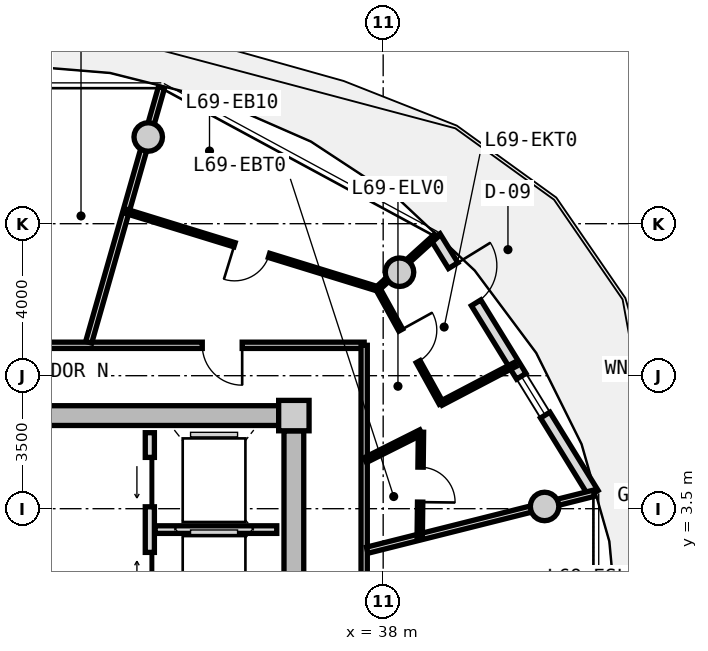
"""IFC4 building model, lengths in metres.
Left out: names, types, materials, properties, quantities, classifications, styles, units other than length and angle.
Written with IfcOpenShell. Run it as: python <this file> out.ifc"""

import sys

from ifc_helpers import new_model, si_unit, direction, frame, frame_2d, origin, origin_2d, place, context, subcontext, project, spatial, rectangle, circle, extrude, source, transform, mapped, element, fill, save


model = new_model("IFC4")
c1 = context("Model", 3, precision=1e-05, world=origin(), true_north=direction((0.0, 1.0)))
c2 = subcontext(c1, "Body", "Model", "MODEL_VIEW")
j1 = project(units=[si_unit("LENGTHUNIT", "METRE"), si_unit("PLANEANGLEUNIT", "RADIAN")], contexts=[c1])
p1 = place(None, origin())
s1 = spatial("IfcSite", under=j1, at=p1, CompositionType="ELEMENT")
p2 = place(p1, origin())
s2 = spatial("IfcBuilding", under=s1, at=p2, CompositionType="ELEMENT")
p3 = place(p2, frame((0.0, 0.0, 223.05)))
s3 = spatial("IfcBuildingStorey", under=s2, at=p3, CompositionType="ELEMENT", Elevation=223.05)
m1 = source(origin(), c2, "Body", "SweptSolid", [
    extrude(rectangle(XDim=0.8, YDim=0.8, at=origin_2d()), origin(), (0.0, 0.0, 1.0), 3.05),
])
p4 = place(p3, frame((35.65, 5.95, 0.0), z_axis=(0.0, 0.0, 1.0), x_axis=(1.0, 0.0, 0.0)))
e1 = element("IfcColumn", 1, at=p4, inside=s3, PredefinedType="COLUMN", context=c2, shape_type="MappedRepresentation", body=[
    mapped(m1, transform((0.0, 0.0, 0.0), x_axis=(1.0, 0.0, 0.0), y_axis=(0.0, 1.0, 0.0), z_axis=(0.0, 0.0, 1.0), scale=1.0)),
])
m2 = source(origin(), c2, "Body", "SweptSolid", [
    extrude(rectangle(XDim=14.5, YDim=0.52, at=frame_2d((7.25, 0.0))), origin(), (0.0, 0.0, 1.0), 2.76),
])
p5 = place(p3, frame((20.75, 5.95, 0.0), z_axis=(0.0, 0.0, 1.0), x_axis=(1.0, 0.0, 0.0)))
e2 = element("IfcWall", 2, at=p5, inside=s3, PredefinedType="SHEAR", context=c2, shape_type="MappedRepresentation", body=[
    mapped(m2, transform((0.0, 0.0, 0.0), x_axis=(1.0, 0.0, 0.0), y_axis=(0.0, 1.0, 0.0), z_axis=(0.0, 0.0, 1.0), scale=1.0)),
])
m3 = source(origin(), c2, "Body", "SweptSolid", [
    extrude(rectangle(XDim=11.1, YDim=0.52, at=frame_2d((5.55, 0.0))), origin(), (0.0, 0.0, 1.0), 2.76),
])
p6 = place(p3, frame((35.65, 5.55, 0.0), z_axis=(0.0, 0.0, 1.0), x_axis=(0.0, -1.0, 0.0)))
e3 = element("IfcWall", 3, at=p6, inside=s3, PredefinedType="SHEAR", context=c2, shape_type="MappedRepresentation", body=[
    mapped(m3, transform((0.0, 0.0, 0.0), x_axis=(1.0, 0.0, 0.0), y_axis=(0.0, 1.0, 0.0), z_axis=(0.0, 0.0, 1.0), scale=1.0)),
])
p7 = place(p6, frame((5.65, 0.0, 0.0)))
e4 = element("IfcOpeningElement", 4, at=p7, cuts=e3, PredefinedType="OPENING", context=c2, shape_type="SweptSolid", body=[
    extrude(rectangle(XDim=1.2, YDim=2.15, at=frame_2d((0.6, 1.075))), frame((0.0, 0.27, 0.0), z_axis=(0.0, -1.0, 0.0), x_axis=(1.0, 0.0, 0.0)), (0.0, 0.0, 1.0), 0.54),
])
m4 = source(origin(), c2, "Body", "SweptSolid", [
    extrude(circle(Radius=0.375, at=origin_2d()), origin(), (0.0, 0.0, 1.0), 3.05),
])
for number, where, z_axis, x_axis in (
    (5, (42.247, 3.559, 0.0), (0.0, 0.0, 1.0), (1.0, 0.0, 0.0)),
    (6, (38.43, 9.723, 0.0), (0.0, 0.0, 1.0), (1.0, 0.0, 0.0)),
    (7, (31.818, 13.281, 0.0), (0.0, 0.0, 1.0), (1.0, 0.0, 0.0)),
):
    element("IfcColumn", number, at=place(p3, frame(where, z_axis=z_axis, x_axis=x_axis)), inside=s3, PredefinedType="COLUMN", context=c2, shape_type="MappedRepresentation", body=[
        mapped(m4, transform((0.0, 0.0, 0.0), x_axis=(1.0, 0.0, 0.0), y_axis=(0.0, 1.0, 0.0), z_axis=(0.0, 0.0, 1.0), scale=1.0)),
    ])
m5 = source(origin(), c2, "Body", "SweptSolid", [
    extrude(rectangle(XDim=7.938, YDim=0.29, at=frame_2d((3.969, 0.0))), origin(), (0.0, 0.0, 1.0), 2.76),
])
p8 = place(p3, frame((39.37, 10.663, 0.0), z_axis=(0.0, 0.0, 1.0), x_axis=(0.524244987663, -0.851567491694, 0.0)))
e8 = element("IfcWall", 8, at=p8, inside=s3, PredefinedType="SOLIDWALL", context=c2, shape_type="MappedRepresentation", body=[
    mapped(m5, transform((0.0, 0.0, 0.0), x_axis=(1.0, 0.0, 0.0), y_axis=(0.0, 1.0, 0.0), z_axis=(0.0, 0.0, 1.0), scale=1.0)),
])
p9 = place(p8, frame((0.9, 0.0, 0.0)))
e9 = element("IfcOpeningElement", 9, at=p9, cuts=e8, PredefinedType="OPENING", context=c2, shape_type="SweptSolid", body=[
    extrude(rectangle(XDim=1.15, YDim=2.25, at=frame_2d((0.575, 1.125))), frame((0.0, 0.155, 0.0), z_axis=(0.0, -1.0, 0.0), x_axis=(1.0, 0.0, 0.0)), (0.0, 0.0, 1.0), 0.31),
])
p10 = place(p8, frame((4.319, 0.0, 0.85)))
e10 = element("IfcOpeningElement", 10, at=p10, cuts=e8, PredefinedType="OPENING", context=c2, shape_type="SweptSolid", body=[
    extrude(rectangle(XDim=1.2, YDim=1.5, at=frame_2d((0.6, 0.75))), frame((0.0, 0.155, 0.0), z_axis=(0.0, -1.0, 0.0), x_axis=(1.0, 0.0, 0.0)), (0.0, 0.0, 1.0), 0.31),
])
m6 = source(origin(), c2, "Body", "SweptSolid", [
    extrude(rectangle(XDim=5.0, YDim=0.24, at=frame_2d((2.5, 0.0))), origin(), (0.0, 0.0, 1.0), 2.745),
])
p11 = place(p3, frame((31.86, 0.5, 0.0), z_axis=(0.0, 0.0, 1.0), x_axis=(0.0, 1.0, 0.0)))
e11 = element("IfcWall", 11, at=p11, inside=s3, PredefinedType="PARTITIONING", context=c2, shape_type="MappedRepresentation", body=[
    mapped(m6, transform((0.0, 0.0, 0.0), x_axis=(1.0, 0.0, 0.0), y_axis=(0.0, 1.0, 0.0), z_axis=(0.0, 0.0, 1.0), scale=1.0)),
])
p12 = place(p11, frame((3.05, 0.0, 0.0)))
e12 = element("IfcOpeningElement", 12, at=p12, cuts=e11, PredefinedType="OPENING", context=c2, shape_type="SweptSolid", body=[
    extrude(rectangle(XDim=1.3, YDim=2.2, at=frame_2d((0.65, 1.1))), frame((0.0, 0.13, 0.0), z_axis=(0.0, -1.0, 0.0), x_axis=(1.0, 0.0, 0.0)), (0.0, 0.0, 1.0), 0.26),
])
p13 = place(p11, frame((0.55, 0.0, 0.0)))
e13 = element("IfcOpeningElement", 13, at=p13, cuts=e11, PredefinedType="OPENING", context=c2, shape_type="SweptSolid", body=[
    extrude(rectangle(XDim=1.3, YDim=2.2, at=frame_2d((0.65, 1.1))), frame((0.0, 0.13, 0.0), z_axis=(0.0, -1.0, 0.0), x_axis=(1.0, 0.0, 0.0)), (0.0, 0.0, 1.0), 0.26),
])
m7 = source(origin(), c2, "Body", "SweptSolid", [
    extrude(rectangle(XDim=3.2, YDim=0.2, at=frame_2d((1.6, 0.0))), origin(), (0.0, 0.0, 1.0), 2.745),
])
p14 = place(p3, frame((32.0, 2.95, 0.0), z_axis=(0.0, 0.0, 1.0), x_axis=(1.0, 0.0, 0.0)))
e14 = element("IfcWall", 14, at=p14, inside=s3, PredefinedType="PARTITIONING", context=c2, shape_type="MappedRepresentation", body=[
    mapped(m7, transform((0.0, 0.0, 0.0), x_axis=(1.0, 0.0, 0.0), y_axis=(0.0, 1.0, 0.0), z_axis=(0.0, 0.0, 1.0), scale=1.0)),
])
m8 = source(origin(), c2, "Body", "SweptSolid", [
    extrude(rectangle(XDim=8.58, YDim=0.165, at=frame_2d((4.29, 0.0))), origin(), (0.0, 0.0, 1.0), 2.745),
])
p15 = place(p3, frame((28.92, 7.8, 0.0), z_axis=(0.0, 0.0, 1.0), x_axis=(1.0, 0.0, 0.0)))
e15 = element("IfcWall", 15, at=p15, inside=s3, PredefinedType="PARTITIONING", context=c2, shape_type="MappedRepresentation", body=[
    mapped(m8, transform((0.0, 0.0, 0.0), x_axis=(1.0, 0.0, 0.0), y_axis=(0.0, 1.0, 0.0), z_axis=(0.0, 0.0, 1.0), scale=1.0)),
])
p16 = place(p15, frame((4.32, 0.0, 0.0)))
e16 = element("IfcOpeningElement", 16, at=p16, cuts=e15, PredefinedType="OPENING", context=c2, shape_type="SweptSolid", body=[
    extrude(rectangle(XDim=1.05, YDim=2.15, at=frame_2d((0.525, 1.075))), frame((0.0, 0.093, 0.0), z_axis=(0.0, -1.0, 0.0), x_axis=(1.0, 0.0, 0.0)), (0.0, 0.0, 1.0), 0.185),
])
m9 = source(origin(), c2, "Body", "SweptSolid", [
    extrude(rectangle(XDim=6.88, YDim=0.165, at=frame_2d((3.44, 0.0))), origin(), (0.0, 0.0, 1.0), 2.745),
])
p17 = place(p3, frame((37.5, 7.8, 0.0), z_axis=(0.0, 0.0, 1.0), x_axis=(0.0, -1.0, 0.0)))
e17 = element("IfcWall", 17, at=p17, inside=s3, PredefinedType="PARTITIONING", context=c2, shape_type="MappedRepresentation", body=[
    mapped(m9, transform((0.0, 0.0, 0.0), x_axis=(1.0, 0.0, 0.0), y_axis=(0.0, 1.0, 0.0), z_axis=(0.0, 0.0, 1.0), scale=1.0)),
])
m10 = source(origin(), c2, "Body", "SweptSolid", [
    extrude(rectangle(XDim=6.974, YDim=0.165, at=frame_2d((3.487, 0.0))), origin(), (0.0, 0.0, 1.0), 2.345),
])
p18 = place(p3, frame((30.251, 7.88, 0.0), z_axis=(0.0, 0.0, 1.0), x_axis=(0.274707256801, 0.961527910703, 0.0)))
e18 = element("IfcWall", 18, at=p18, inside=s3, PredefinedType="PARTITIONING", context=c2, shape_type="MappedRepresentation", body=[
    mapped(m10, transform((0.0, 0.0, 0.0), x_axis=(1.0, 0.0, 0.0), y_axis=(0.0, 1.0, 0.0), z_axis=(0.0, 0.0, 1.0), scale=1.0)),
])
m11 = source(origin(), c2, "Body", "SweptSolid", [
    extrude(rectangle(XDim=6.157, YDim=0.165, at=frame_2d((3.079, 0.0))), origin(), (0.0, 0.0, 1.0), 2.345),
])
p19 = place(p3, frame((37.58, 2.407, 0.0), z_axis=(0.0, 0.0, 1.0), x_axis=(0.969840867184, 0.243738984038, 0.0)))
e19 = element("IfcWall", 19, at=p19, inside=s3, PredefinedType="PARTITIONING", context=c2, shape_type="MappedRepresentation", body=[
    mapped(m11, transform((0.0, 0.0, 0.0), x_axis=(1.0, 0.0, 0.0), y_axis=(0.0, 1.0, 0.0), z_axis=(0.0, 0.0, 1.0), scale=1.0)),
])
m12 = source(origin(), c2, "Body", "SweptSolid", [
    extrude(rectangle(XDim=6.919, YDim=0.115, at=frame_2d((3.459, 0.0))), origin(), (0.0, 0.0, 1.0), 2.745),
])
p20 = place(p3, frame((37.849, 9.287, 0.0), z_axis=(0.0, 0.0, 1.0), x_axis=(-0.955678249072, 0.294413118341, 0.0)))
e20 = element("IfcWall", 20, at=p20, inside=s3, PredefinedType="PARTITIONING", context=c2, shape_type="MappedRepresentation", body=[
    mapped(m12, transform((0.0, 0.0, 0.0), x_axis=(1.0, 0.0, 0.0), y_axis=(0.0, 1.0, 0.0), z_axis=(0.0, 0.0, 1.0), scale=1.0)),
])
p21 = place(p20, frame((2.985, 0.0, 0.0)))
e21 = element("IfcOpeningElement", 21, at=p21, cuts=e20, PredefinedType="OPENING", context=c2, shape_type="SweptSolid", body=[
    extrude(rectangle(XDim=0.95, YDim=2.1, at=frame_2d((0.475, 1.05))), frame((0.0, 0.067, 0.0), z_axis=(0.0, -1.0, 0.0), x_axis=(1.0, 0.0, 0.0)), (0.0, 0.0, 1.0), 0.135),
])
m13 = source(origin(), c2, "Body", "SweptSolid", [
    extrude(rectangle(XDim=2.072, YDim=0.115, at=frame_2d((1.036, 0.0))), origin(), (0.0, 0.0, 1.0), 2.345),
])
p22 = place(p3, frame((37.849, 9.287, 0.0), z_axis=(0.0, 0.0, 1.0), x_axis=(0.741410125356, 0.671052178314, 0.0)))
e22 = element("IfcWall", 22, at=p22, inside=s3, PredefinedType="PARTITIONING", context=c2, shape_type="MappedRepresentation", body=[
    mapped(m13, transform((0.0, 0.0, 0.0), x_axis=(1.0, 0.0, 0.0), y_axis=(0.0, 1.0, 0.0), z_axis=(0.0, 0.0, 1.0), scale=1.0)),
])
m14 = source(origin(), c2, "Body", "SweptSolid", [
    extrude(rectangle(XDim=1.638, YDim=0.14, at=frame_2d((0.819, 0.0))), origin(), (0.0, 0.0, 1.0), 2.745),
])
p23 = place(p3, frame((37.53, 4.778, 0.0), z_axis=(0.0, 0.0, 1.0), x_axis=(0.893919977945, 0.448226586707, 0.0)))
e23 = element("IfcWall", 23, at=p23, inside=s3, PredefinedType="PARTITIONING", context=c2, shape_type="MappedRepresentation", body=[
    mapped(m14, transform((0.0, 0.0, 0.0), x_axis=(1.0, 0.0, 0.0), y_axis=(0.0, 1.0, 0.0), z_axis=(0.0, 0.0, 1.0), scale=1.0)),
])
m15 = source(origin(), c2, "Body", "SweptSolid", [
    extrude(rectangle(XDim=2.759, YDim=0.14, at=frame_2d((1.379, 0.0))), origin(), (0.0, 0.0, 1.0), 2.745),
])
p24 = place(p3, frame((38.995, 5.513, 0.0), z_axis=(0.0, 0.0, 1.0), x_axis=(-0.01194710728, -0.999928630767, 0.0)))
e24 = element("IfcWall", 24, at=p24, inside=s3, PredefinedType="PARTITIONING", context=c2, shape_type="MappedRepresentation", body=[
    mapped(m15, transform((0.0, 0.0, 0.0), x_axis=(1.0, 0.0, 0.0), y_axis=(0.0, 1.0, 0.0), z_axis=(0.0, 0.0, 1.0), scale=1.0)),
])
p25 = place(p24, frame((0.919, 0.0, 0.0)))
e25 = element("IfcOpeningElement", 25, at=p25, cuts=e24, PredefinedType="OPENING", context=c2, shape_type="SweptSolid", body=[
    extrude(rectangle(XDim=0.92, YDim=2.1, at=frame_2d((0.46, 1.05))), frame((0.0, 0.08, 0.0), z_axis=(0.0, -1.0, 0.0), x_axis=(1.0, 0.0, 0.0)), (0.0, 0.0, 1.0), 0.16),
])
m16 = source(origin(), c2, "Body", "SweptSolid", [
    extrude(rectangle(XDim=2.193, YDim=0.115, at=frame_2d((1.097, 0.0))), origin(), (0.0, 0.0, 1.0), 2.745),
])
p26 = place(p3, frame((39.525, 6.275, 0.0), z_axis=(0.0, 0.0, 1.0), x_axis=(0.885783595046, 0.464098505435, 0.0)))
e26 = element("IfcWall", 26, at=p26, inside=s3, PredefinedType="PARTITIONING", context=c2, shape_type="MappedRepresentation", body=[
    mapped(m16, transform((0.0, 0.0, 0.0), x_axis=(1.0, 0.0, 0.0), y_axis=(0.0, 1.0, 0.0), z_axis=(0.0, 0.0, 1.0), scale=1.0)),
])
m17 = source(origin(), c2, "Body", "SweptSolid", [
    extrude(rectangle(XDim=3.45, YDim=0.115, at=frame_2d((1.725, 0.0))), origin(), (0.0, 0.0, 1.0), 2.745),
])
p27 = place(p3, frame((39.525, 6.275, 0.0), z_axis=(0.0, 0.0, 1.0), x_axis=(-0.483659007882, 0.875256513312, 0.0)))
e27 = element("IfcWall", 27, at=p27, inside=s3, PredefinedType="PARTITIONING", context=c2, shape_type="MappedRepresentation", body=[
    mapped(m17, transform((0.0, 0.0, 0.0), x_axis=(1.0, 0.0, 0.0), y_axis=(0.0, 1.0, 0.0), z_axis=(0.0, 0.0, 1.0), scale=1.0)),
])
p28 = place(p27, frame((1.25, 0.0, 0.0)))
e28 = element("IfcOpeningElement", 28, at=p28, cuts=e27, PredefinedType="OPENING", context=c2, shape_type="SweptSolid", body=[
    extrude(rectangle(XDim=0.95, YDim=2.1, at=frame_2d((0.475, 1.05))), frame((0.0, 0.067, 0.0), z_axis=(0.0, -1.0, 0.0), x_axis=(1.0, 0.0, 0.0)), (0.0, 0.0, 1.0), 0.135),
])
m18 = source(origin(), c2, "Body", "SweptSolid", [
    extrude(rectangle(XDim=1.15, YDim=2.25, at=frame_2d((0.575, 1.125))), frame((0.0, 0.025, 0.0), z_axis=(0.0, -1.0, 0.0), x_axis=(1.0, 0.0, 0.0)), (0.0, 0.0, 1.0), 0.05),
])
p29 = place(p9, origin())
e29 = element("IfcDoor", 29, at=p29, inside=s3, OperationType="SINGLE_SWING_LEFT", PredefinedType="DOOR", context=c2, shape_type="MappedRepresentation", body=[
    mapped(m18, transform((0.0, 0.0, 0.0), x_axis=(1.0, 0.0, 0.0), y_axis=(0.0, 1.0, 0.0), z_axis=(0.0, 0.0, 1.0), scale=1.0)),
])
fill(e9, e29)
m19 = source(origin(), c2, "Body", "SweptSolid", [
    extrude(rectangle(XDim=1.2, YDim=1.5, at=frame_2d((0.6, 0.75))), frame((0.0, 0.03, 0.0), z_axis=(0.0, -1.0, 0.0), x_axis=(1.0, 0.0, 0.0)), (0.0, 0.0, 1.0), 0.06),
])
p30 = place(p10, origin())
e30 = element("IfcWindow", 30, at=p30, inside=s3, PartitioningType="SINGLE_PANEL", PredefinedType="WINDOW", context=c2, shape_type="MappedRepresentation", body=[
    mapped(m19, transform((0.0, 0.0, 0.0), x_axis=(1.0, 0.0, 0.0), y_axis=(0.0, 1.0, 0.0), z_axis=(0.0, 0.0, 1.0), scale=1.0)),
])
fill(e10, e30)
m20 = source(origin(), c2, "Body", "SweptSolid", [
    extrude(rectangle(XDim=1.3, YDim=2.2, at=frame_2d((0.65, 1.1))), frame((0.0, 0.025, 0.0), z_axis=(0.0, -1.0, 0.0), x_axis=(1.0, 0.0, 0.0)), (0.0, 0.0, 1.0), 0.05),
])
p31 = place(p12, origin())
e31 = element("IfcDoor", 31, at=p31, inside=s3, OperationType="SLIDING_TO_LEFT", PredefinedType="DOOR", context=c2, shape_type="MappedRepresentation", body=[
    mapped(m20, transform((0.0, 0.0, 0.0), x_axis=(1.0, 0.0, 0.0), y_axis=(0.0, 1.0, 0.0), z_axis=(0.0, 0.0, 1.0), scale=1.0)),
])
fill(e12, e31)
p32 = place(p13, origin())
e32 = element("IfcDoor", 32, at=p32, inside=s3, OperationType="SLIDING_TO_RIGHT", PredefinedType="DOOR", context=c2, shape_type="MappedRepresentation", body=[
    mapped(m20, transform((0.0, 0.0, 0.0), x_axis=(1.0, 0.0, 0.0), y_axis=(0.0, 1.0, 0.0), z_axis=(0.0, 0.0, 1.0), scale=1.0)),
])
fill(e13, e32)
m21 = source(origin(), c2, "Body", "SweptSolid", [
    extrude(rectangle(XDim=1.05, YDim=2.15, at=frame_2d((0.525, 1.075))), frame((0.0, 0.025, 0.0), z_axis=(0.0, -1.0, 0.0), x_axis=(1.0, 0.0, 0.0)), (0.0, 0.0, 1.0), 0.05),
])
p33 = place(p16, frame((1.05, 0.0, 0.0), z_axis=(0.0, 0.0, 1.0), x_axis=(-1.0, 0.0, 0.0)))
e33 = element("IfcDoor", 33, at=p33, inside=s3, OperationType="SINGLE_SWING_LEFT", PredefinedType="DOOR", context=c2, shape_type="MappedRepresentation", body=[
    mapped(m21, transform((0.0, 0.0, 0.0), x_axis=(1.0, 0.0, 0.0), y_axis=(0.0, 1.0, 0.0), z_axis=(0.0, 0.0, 1.0), scale=1.0)),
])
fill(e16, e33)
m22 = source(origin(), c2, "Body", "SweptSolid", [
    extrude(rectangle(XDim=0.92, YDim=2.1, at=frame_2d((0.46, 1.05))), frame((0.0, 0.025, 0.0), z_axis=(0.0, -1.0, 0.0), x_axis=(1.0, 0.0, 0.0)), (0.0, 0.0, 1.0), 0.05),
])
p34 = place(p25, origin())
e34 = element("IfcDoor", 34, at=p34, inside=s3, OperationType="SINGLE_SWING_RIGHT", PredefinedType="DOOR", context=c2, shape_type="MappedRepresentation", body=[
    mapped(m22, transform((0.0, 0.0, 0.0), x_axis=(1.0, 0.0, 0.0), y_axis=(0.0, 1.0, 0.0), z_axis=(0.0, 0.0, 1.0), scale=1.0)),
])
fill(e25, e34)
m23 = source(origin(), c2, "Body", "SweptSolid", [
    extrude(rectangle(XDim=0.95, YDim=2.1, at=frame_2d((0.475, 1.05))), frame((0.0, 0.025, 0.0), z_axis=(0.0, -1.0, 0.0), x_axis=(1.0, 0.0, 0.0)), (0.0, 0.0, 1.0), 0.05),
])
p35 = place(p28, frame((0.95, 0.0, 0.0), z_axis=(0.0, 0.0, 1.0), x_axis=(-1.0, 0.0, 0.0)))
e35 = element("IfcDoor", 35, at=p35, inside=s3, OperationType="SINGLE_SWING_LEFT", PredefinedType="DOOR", context=c2, shape_type="MappedRepresentation", body=[
    mapped(m23, transform((0.0, 0.0, 0.0), x_axis=(1.0, 0.0, 0.0), y_axis=(0.0, 1.0, 0.0), z_axis=(0.0, 0.0, 1.0), scale=1.0)),
])
fill(e28, e35)
p36 = place(p21, origin())
e36 = element("IfcDoor", 36, at=p36, inside=s3, OperationType="SINGLE_SWING_RIGHT", PredefinedType="DOOR", context=c2, shape_type="MappedRepresentation", body=[
    mapped(m23, transform((0.0, 0.0, 0.0), x_axis=(1.0, 0.0, 0.0), y_axis=(0.0, 1.0, 0.0), z_axis=(0.0, 0.0, 1.0), scale=1.0)),
])
fill(e21, e36)
save(model, sys.argv[1])
